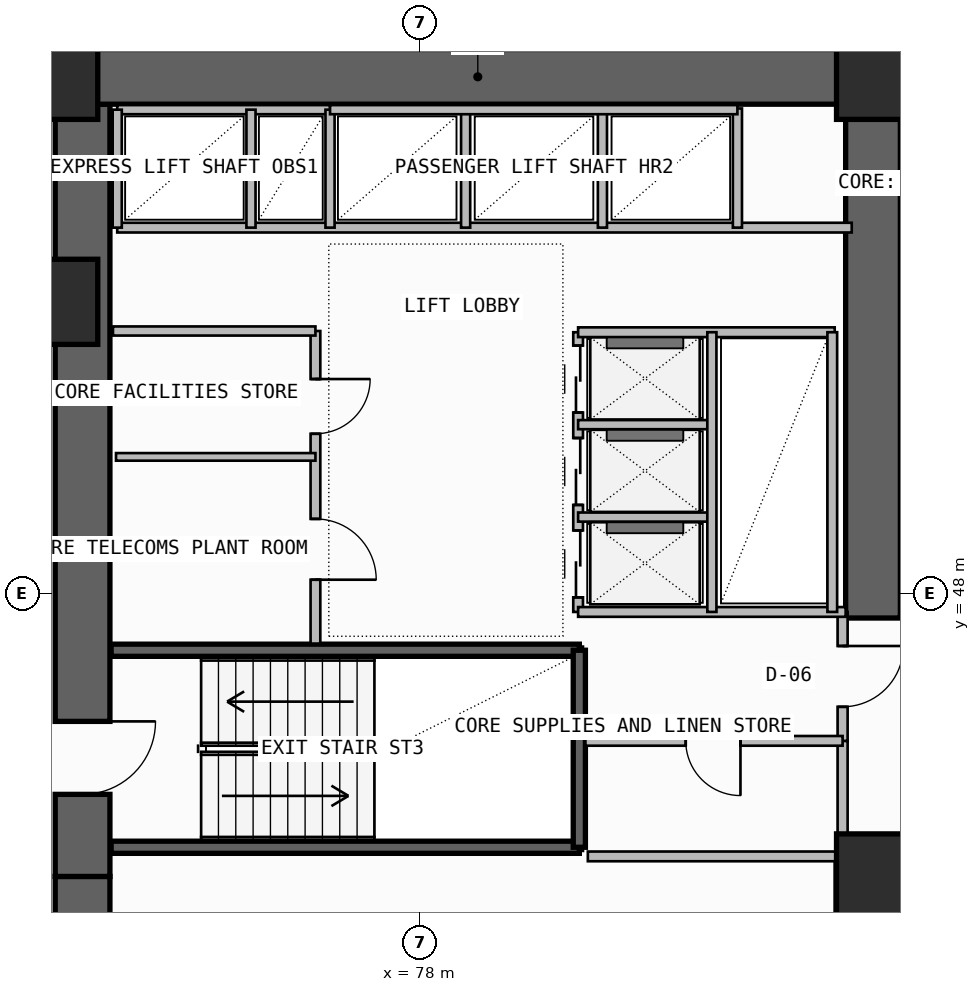
"""IFC4 building model, lengths in metres.
Left out: names, types, materials, properties, quantities, classifications, styles, units other than length and angle.
Written with IfcOpenShell. Run it as: python <this file> out.ifc"""

import sys

from ifc_helpers import new_model, si_unit, direction, frame, frame_2d, origin, origin_2d, place, context, subcontext, project, spatial, rectangle, extrude, element, fill, save


model = new_model("IFC4")
c1 = context("Model", 3, precision=1e-05, world=origin(), true_north=direction((0.0, 1.0)))
c2 = subcontext(c1, "Body", "Model", "MODEL_VIEW")
j1 = project(units=[si_unit("LENGTHUNIT", "METRE"), si_unit("PLANEANGLEUNIT", "RADIAN")], contexts=[c1])
p1 = place(None, origin())
s1 = spatial("IfcSite", under=j1, at=p1, CompositionType="ELEMENT")
p2 = place(p1, origin())
s2 = spatial("IfcBuilding", under=s1, at=p2, CompositionType="ELEMENT")
p3 = place(p2, frame((0.0, 0.0, 135.9)))
s3 = spatial("IfcBuildingStorey", under=s2, at=p3, CompositionType="ELEMENT", Elevation=135.9)
p4 = place(p3, frame((72.45, 35.5, -0.26), z_axis=(0.0, 0.0, 1.0), x_axis=(0.0, 1.0, 0.0)))
e1 = element("IfcWall", 1, at=p4, inside=s3, PredefinedType="SHEAR", context=c2, shape_type="SweptSolid", body=[
    extrude(rectangle(XDim=7.85, YDim=0.9, at=frame_2d((3.925, 0.0))), origin(), (0.0, 0.0, 1.0), 3.6),
])
p5 = place(p4, frame((1.45, 0.0, 0.26)))
e2 = element("IfcOpeningElement", 2, at=p5, cuts=e1, PredefinedType="OPENING", context=c2, shape_type="SweptSolid", body=[
    extrude(rectangle(XDim=1.2, YDim=2.2, at=frame_2d((0.6, 1.1))), frame((0.0, 0.46, 0.0), z_axis=(0.0, -1.0, 0.0), x_axis=(1.0, 0.0, 0.0)), (0.0, 0.0, 1.0), 0.92),
])
p6 = place(p3, frame((72.45, 43.35, -0.26), z_axis=(0.0, 0.0, 1.0), x_axis=(0.0, 1.0, 0.0)))
e3 = element("IfcWall", 3, at=p6, inside=s3, PredefinedType="SHEAR", context=c2, shape_type="SweptSolid", body=[
    extrude(rectangle(XDim=12.7, YDim=0.9, at=frame_2d((6.35, 0.0))), origin(), (0.0, 0.0, 1.0), 3.6),
])
p7 = place(p6, frame((1.35, 0.0, 0.26)))
e4 = element("IfcOpeningElement", 4, at=p7, cuts=e3, PredefinedType="OPENING", context=c2, shape_type="SweptSolid", body=[
    extrude(rectangle(XDim=1.2, YDim=2.2, at=frame_2d((0.6, 1.1))), frame((0.0, 0.46, 0.0), z_axis=(0.0, -1.0, 0.0), x_axis=(1.0, 0.0, 0.0)), (0.0, 0.0, 1.0), 0.92),
])
p8 = place(p3, frame((72.0, 56.5, -0.26), z_axis=(0.0, 0.0, 1.0), x_axis=(1.0, 0.0, 0.0)))
e5 = element("IfcWall", 5, at=p8, inside=s3, PredefinedType="SHEAR", context=c2, shape_type="SweptSolid", body=[
    extrude(rectangle(XDim=13.9, YDim=0.9, at=frame_2d((6.95, 0.0))), origin(), (0.0, 0.0, 1.0), 3.6),
])
p9 = place(p3, frame((85.45, 47.6, -0.26), z_axis=(0.0, 0.0, 1.0), x_axis=(0.0, 1.0, 0.0)))
e6 = element("IfcWall", 6, at=p9, inside=s3, PredefinedType="SHEAR", context=c2, shape_type="SweptSolid", body=[
    extrude(rectangle(XDim=8.45, YDim=0.9, at=frame_2d((4.225, 0.0))), origin(), (0.0, 0.0, 1.0), 3.6),
])
for number, where, z_axis, x_axis in (
    (7, (85.55, 43.35, 0.0), (0.0, 0.0, 1.0), (1.0, 0.0, 0.0)),
    (8, (72.0, 52.8, 0.0), (0.0, 0.0, 1.0), (1.0, 0.0, 0.0)),
    (9, (72.0, 56.5, 0.0), (0.0, 0.0, 1.0), (1.0, 0.0, 0.0)),
    (10, (85.55, 56.5, 0.0), (0.0, 0.0, 1.0), (1.0, 0.0, 0.0)),
):
    element("IfcColumn", number, at=place(p3, frame(where, z_axis=z_axis, x_axis=x_axis)), inside=s3, PredefinedType="COLUMN", context=c2, shape_type="SweptSolid", body=[
        extrude(rectangle(XDim=1.4, YDim=1.4, at=origin_2d()), origin(), (0.0, 0.0, 1.0), 3.6),
    ])
p10 = place(p3, frame((84.92, 38.85, 0.0), z_axis=(0.0, 0.0, 1.0), x_axis=(0.0, 1.0, 0.0)))
e11 = element("IfcWall", 11, at=p10, inside=s3, PredefinedType="SOLIDWALL", context=c2, shape_type="SweptSolid", body=[
    extrude(rectangle(XDim=4.83, YDim=0.2, at=frame_2d((2.415, 0.0))), origin(), (0.0, 0.0, 1.0), 3.34),
])
p11 = place(p10, frame((1.25, 0.0, 0.0)))
e12 = element("IfcOpeningElement", 12, at=p11, cuts=e11, PredefinedType="OPENING", context=c2, shape_type="SweptSolid", body=[
    extrude(rectangle(XDim=1.1, YDim=2.2, at=frame_2d((0.55, 1.1))), frame((0.0, 0.11, 0.0), z_axis=(0.0, -1.0, 0.0), x_axis=(1.0, 0.0, 0.0)), (0.0, 0.0, 1.0), 0.22),
])
for number, where, z_axis, x_axis in (
    (13, (72.92, 43.83, -0.26), (0.0, 0.0, 1.0), (1.0, 0.0, 0.0)),
    (14, (72.92, 47.07, -0.26), (0.0, 0.0, 1.0), (1.0, 0.0, 0.0)),
):
    element("IfcWall", number, at=place(p3, frame(where, z_axis=z_axis, x_axis=x_axis)), inside=s3, PredefinedType="SOLIDWALL", context=c2, shape_type="SweptSolid", body=[
        extrude(rectangle(XDim=7.7, YDim=0.2, at=frame_2d((3.85, 0.0))), origin(), (0.0, 0.0, 1.0), 3.6),
    ])
p12 = place(p3, frame((80.62, 43.83, -0.26), z_axis=(0.0, 0.0, 1.0), x_axis=(0.0, 1.0, 0.0)))
e15 = element("IfcWall", 15, at=p12, inside=s3, PredefinedType="SOLIDWALL", context=c2, shape_type="SweptSolid", body=[
    extrude(rectangle(XDim=3.24, YDim=0.2, at=frame_2d((1.62, 0.0))), origin(), (0.0, 0.0, 1.0), 3.6),
])
p13 = place(p3, frame((84.95, 43.68, 0.0), z_axis=(0.0, 0.0, 1.0), x_axis=(0.0, 1.0, 0.0)))
e16 = element("IfcWall", 16, at=p13, inside=s3, PredefinedType="PLUMBINGWALL", context=c2, shape_type="SweptSolid", body=[
    extrude(rectangle(XDim=1.9, YDim=0.165, at=frame_2d((0.95, 0.0))), origin(), (0.0, 0.0, 1.0), 3.34),
])
p14 = place(p3, frame((84.95, 45.58, 0.0), z_axis=(0.0, 0.0, 1.0), x_axis=(0.0, 1.0, 0.0)))
e17 = element("IfcWall", 17, at=p14, inside=s3, PredefinedType="PARTITIONING", context=c2, shape_type="SweptSolid", body=[
    extrude(rectangle(XDim=2.12, YDim=0.165, at=frame_2d((1.06, 0.0))), origin(), (0.0, 0.0, 1.0), 3.34),
])
p15 = place(p14, frame((0.56, 0.0, 0.0)))
e18 = element("IfcOpeningElement", 18, at=p15, cuts=e17, PredefinedType="OPENING", context=c2, shape_type="SweptSolid", body=[
    extrude(rectangle(XDim=1.0, YDim=2.2, at=frame_2d((0.5, 1.1))), frame((0.0, 0.093, 0.0), z_axis=(0.0, -1.0, 0.0), x_axis=(1.0, 0.0, 0.0)), (0.0, 0.0, 1.0), 0.185),
])
p16 = place(p3, frame((80.72, 45.58, 0.0), z_axis=(0.0, 0.0, 1.0), x_axis=(1.0, 0.0, 0.0)))
e19 = element("IfcWall", 19, at=p16, inside=s3, PredefinedType="PLUMBINGWALL", context=c2, shape_type="SweptSolid", body=[
    extrude(rectangle(XDim=4.23, YDim=0.16, at=frame_2d((2.115, 0.0))), origin(), (0.0, 0.0, 1.0), 3.34),
])
p17 = place(p16, frame((1.65, 0.0, 0.0)))
e20 = element("IfcOpeningElement", 20, at=p17, cuts=e19, PredefinedType="OPENING", context=c2, shape_type="SweptSolid", body=[
    extrude(rectangle(XDim=0.9, YDim=2.1, at=frame_2d((0.45, 1.05))), frame((0.0, 0.09, 0.0), z_axis=(0.0, -1.0, 0.0), x_axis=(1.0, 0.0, 0.0)), (0.0, 0.0, 1.0), 0.18),
])
p18 = place(p3, frame((80.76, 43.68, 0.0), z_axis=(0.0, 0.0, 1.0), x_axis=(1.0, 0.0, 0.0)))
e21 = element("IfcWall", 21, at=p18, inside=s3, PredefinedType="PLUMBINGWALL", context=c2, shape_type="SweptSolid", body=[
    extrude(rectangle(XDim=4.19, YDim=0.16, at=frame_2d((2.095, 0.0))), origin(), (0.0, 0.0, 1.0), 3.34),
])
p19 = place(p3, frame((76.28, 47.18, 0.0), z_axis=(0.0, 0.0, 1.0), x_axis=(0.0, 1.0, 0.0)))
e22 = element("IfcWall", 22, at=p19, inside=s3, PredefinedType="SOLIDWALL", context=c2, shape_type="SweptSolid", body=[
    extrude(rectangle(XDim=5.14, YDim=0.16, at=frame_2d((2.57, 0.0))), origin(), (0.0, 0.0, 1.0), 3.34),
])
p20 = place(p19, frame((1.05, 0.0, 0.0)))
e23 = element("IfcOpeningElement", 23, at=p20, cuts=e22, PredefinedType="OPENING", context=c2, shape_type="SweptSolid", body=[
    extrude(rectangle(XDim=1.0, YDim=2.2, at=frame_2d((0.5, 1.1))), frame((0.0, 0.09, 0.0), z_axis=(0.0, -1.0, 0.0), x_axis=(1.0, 0.0, 0.0)), (0.0, 0.0, 1.0), 0.18),
])
p21 = place(p19, frame((3.45, 0.0, 0.0)))
e24 = element("IfcOpeningElement", 24, at=p21, cuts=e22, PredefinedType="OPENING", context=c2, shape_type="SweptSolid", body=[
    extrude(rectangle(XDim=0.9, YDim=2.1, at=frame_2d((0.45, 1.05))), frame((0.0, 0.09, 0.0), z_axis=(0.0, -1.0, 0.0), x_axis=(1.0, 0.0, 0.0)), (0.0, 0.0, 1.0), 0.18),
])
p22 = place(p3, frame((72.95, 52.32, 0.0), z_axis=(0.0, 0.0, 1.0), x_axis=(1.0, 0.0, 0.0)))
e25 = element("IfcWall", 25, at=p22, inside=s3, PredefinedType="SOLIDWALL", context=c2, shape_type="SweptSolid", body=[
    extrude(rectangle(XDim=3.33, YDim=0.15, at=frame_2d((1.665, 0.0))), origin(), (0.0, 0.0, 1.0), 3.34),
])
p23 = place(p3, frame((73.0, 50.25, 0.0), z_axis=(0.0, 0.0, 1.0), x_axis=(1.0, 0.0, 0.0)))
e26 = element("IfcWall", 26, at=p23, inside=s3, PredefinedType="PARTITIONING", context=c2, shape_type="SweptSolid", body=[
    extrude(rectangle(XDim=3.28, YDim=0.125, at=frame_2d((1.64, 0.0))), origin(), (0.0, 0.0, 1.0), 3.34),
])
p24 = place(p3, frame((80.6, 47.7, 0.0), z_axis=(0.0, 0.0, 1.0), x_axis=(0.0, 1.0, 0.0)))
e27 = element("IfcWall", 27, at=p24, inside=s3, PredefinedType="SOLIDWALL", context=c2, shape_type="SweptSolid", body=[
    extrude(rectangle(XDim=4.6, YDim=0.16, at=frame_2d((2.3, 0.0))), origin(), (0.0, 0.0, 1.0), 3.34),
])
p25 = place(p24, frame((0.24, 0.0, 0.0)))
e28 = element("IfcOpeningElement", 28, at=p25, cuts=e27, PredefinedType="OPENING", context=c2, shape_type="SweptSolid", body=[
    extrude(rectangle(XDim=1.1, YDim=2.25, at=frame_2d((0.55, 1.125))), frame((0.0, 0.09, 0.0), z_axis=(0.0, -1.0, 0.0), x_axis=(1.0, 0.0, 0.0)), (0.0, 0.0, 1.0), 0.18),
])
p26 = place(p24, frame((1.76, 0.0, 0.0)))
e29 = element("IfcOpeningElement", 29, at=p26, cuts=e27, PredefinedType="OPENING", context=c2, shape_type="SweptSolid", body=[
    extrude(rectangle(XDim=1.1, YDim=2.25, at=frame_2d((0.55, 1.125))), frame((0.0, 0.09, 0.0), z_axis=(0.0, -1.0, 0.0), x_axis=(1.0, 0.0, 0.0)), (0.0, 0.0, 1.0), 0.18),
])
p27 = place(p24, frame((3.28, 0.0, 0.0)))
e30 = element("IfcOpeningElement", 30, at=p27, cuts=e27, PredefinedType="OPENING", context=c2, shape_type="SweptSolid", body=[
    extrude(rectangle(XDim=1.1, YDim=2.25, at=frame_2d((0.55, 1.125))), frame((0.0, 0.09, 0.0), z_axis=(0.0, -1.0, 0.0), x_axis=(1.0, 0.0, 0.0)), (0.0, 0.0, 1.0), 0.18),
])
p28 = place(p3, frame((80.6, 47.7, 0.0), z_axis=(0.0, 0.0, 1.0), x_axis=(1.0, 0.0, 0.0)))
e31 = element("IfcWall", 31, at=p28, inside=s3, PredefinedType="SOLIDWALL", context=c2, shape_type="SweptSolid", body=[
    extrude(rectangle(XDim=4.4, YDim=0.16, at=frame_2d((2.2, 0.0))), origin(), (0.0, 0.0, 1.0), 3.34),
])
p29 = place(p3, frame((80.6, 52.3, 0.0), z_axis=(0.0, 0.0, 1.0), x_axis=(1.0, 0.0, 0.0)))
e32 = element("IfcWall", 32, at=p29, inside=s3, PredefinedType="SOLIDWALL", context=c2, shape_type="SweptSolid", body=[
    extrude(rectangle(XDim=4.22, YDim=0.16, at=frame_2d((2.11, 0.0))), origin(), (0.0, 0.0, 1.0), 3.34),
])
for number, where, z_axis, x_axis in (
    (33, (80.6, 49.26, 0.0), (0.0, 0.0, 1.0), (1.0, 0.0, 0.0)),
    (34, (80.6, 50.78, 0.0), (0.0, 0.0, 1.0), (1.0, 0.0, 0.0)),
):
    element("IfcWall", number, at=place(p3, frame(where, z_axis=z_axis, x_axis=x_axis)), inside=s3, PredefinedType="PLUMBINGWALL", context=c2, shape_type="SweptSolid", body=[
        extrude(rectangle(XDim=2.2, YDim=0.15, at=frame_2d((1.1, 0.0))), origin(), (0.0, 0.0, 1.0), 3.34),
    ])
p30 = place(p3, frame((82.8, 47.7, 0.0), z_axis=(0.0, 0.0, 1.0), x_axis=(0.0, 1.0, 0.0)))
e35 = element("IfcWall", 35, at=p30, inside=s3, PredefinedType="PLUMBINGWALL", context=c2, shape_type="SweptSolid", body=[
    extrude(rectangle(XDim=4.6, YDim=0.15, at=frame_2d((2.3, 0.0))), origin(), (0.0, 0.0, 1.0), 3.34),
])
p31 = place(p3, frame((84.78, 47.7, 0.0), z_axis=(0.0, 0.0, 1.0), x_axis=(0.0, 1.0, 0.0)))
e36 = element("IfcWall", 36, at=p31, inside=s3, PredefinedType="SOLIDWALL", context=c2, shape_type="SweptSolid", body=[
    extrude(rectangle(XDim=4.6, YDim=0.16, at=frame_2d((2.3, 0.0))), origin(), (0.0, 0.0, 1.0), 3.34),
])
p32 = place(p3, frame((73.02, 54.02, 0.0), z_axis=(0.0, 0.0, 1.0), x_axis=(1.0, 0.0, 0.0)))
e37 = element("IfcWall", 37, at=p32, inside=s3, PredefinedType="SOLIDWALL", context=c2, shape_type="SweptSolid", body=[
    extrude(rectangle(XDim=12.08, YDim=0.16, at=frame_2d((6.04, 0.0))), origin(), (0.0, 0.0, 1.0), 3.34),
])
p33 = place(p3, frame((73.02, 55.96, 0.0), z_axis=(0.0, 0.0, 1.0), x_axis=(1.0, 0.0, 0.0)))
e38 = element("IfcWall", 38, at=p33, inside=s3, PredefinedType="SOLIDWALL", context=c2, shape_type="SweptSolid", body=[
    extrude(rectangle(XDim=3.5, YDim=0.15, at=frame_2d((1.75, 0.0))), origin(), (0.0, 0.0, 1.0), 3.34),
])
p34 = place(p3, frame((73.02, 54.02, 0.0), z_axis=(0.0, 0.0, 1.0), x_axis=(0.0, 1.0, 0.0)))
e39 = element("IfcWall", 39, at=p34, inside=s3, PredefinedType="PLUMBINGWALL", context=c2, shape_type="SweptSolid", body=[
    extrude(rectangle(XDim=1.94, YDim=0.15, at=frame_2d((0.97, 0.0))), origin(), (0.0, 0.0, 1.0), 3.34),
])
p35 = place(p3, frame((76.52, 54.02, 0.0), z_axis=(0.0, 0.0, 1.0), x_axis=(0.0, 1.0, 0.0)))
e40 = element("IfcWall", 40, at=p35, inside=s3, PredefinedType="SOLIDWALL", context=c2, shape_type="SweptSolid", body=[
    extrude(rectangle(XDim=1.94, YDim=0.15, at=frame_2d((0.97, 0.0))), origin(), (0.0, 0.0, 1.0), 3.34),
])
p36 = place(p3, frame((75.22, 54.02, 0.0), z_axis=(0.0, 0.0, 1.0), x_axis=(0.0, 1.0, 0.0)))
e41 = element("IfcWall", 41, at=p36, inside=s3, PredefinedType="PLUMBINGWALL", context=c2, shape_type="SweptSolid", body=[
    extrude(rectangle(XDim=1.94, YDim=0.15, at=frame_2d((0.97, 0.0))), origin(), (0.0, 0.0, 1.0), 3.34),
])
for number, where, z_axis, x_axis in (
    (42, (78.75, 54.02, 0.0), (0.0, 0.0, 1.0), (0.0, 1.0, 0.0)),
    (43, (81.0, 54.02, 0.0), (0.0, 0.0, 1.0), (0.0, 1.0, 0.0)),
):
    element("IfcWall", number, at=place(p3, frame(where, z_axis=z_axis, x_axis=x_axis)), inside=s3, PredefinedType="PLUMBINGWALL", context=c2, shape_type="SweptSolid", body=[
        extrude(rectangle(XDim=1.96, YDim=0.15, at=frame_2d((0.98, 0.0))), origin(), (0.0, 0.0, 1.0), 3.34),
    ])
p37 = place(p3, frame((83.22, 54.02, 0.0), z_axis=(0.0, 0.0, 1.0), x_axis=(0.0, 1.0, 0.0)))
e44 = element("IfcWall", 44, at=p37, inside=s3, PredefinedType="SOLIDWALL", context=c2, shape_type="SweptSolid", body=[
    extrude(rectangle(XDim=1.96, YDim=0.15, at=frame_2d((0.98, 0.0))), origin(), (0.0, 0.0, 1.0), 3.34),
])
p38 = place(p3, frame((76.52, 55.96, 0.0), z_axis=(0.0, 0.0, 1.0), x_axis=(1.0, 0.0, 0.0)))
e45 = element("IfcWall", 45, at=p38, inside=s3, PredefinedType="SOLIDWALL", context=c2, shape_type="SweptSolid", body=[
    extrude(rectangle(XDim=6.7, YDim=0.15, at=frame_2d((3.35, 0.0))), origin(), (0.0, 0.0, 1.0), 3.34),
])
p39 = place(p7, frame((1.2, 0.0, 0.0), z_axis=(0.0, 0.0, 1.0), x_axis=(-1.0, 0.0, 0.0)))
e46 = element("IfcDoor", 46, at=p39, inside=s3, OperationType="SINGLE_SWING_LEFT", PredefinedType="USERDEFINED", context=c2, shape_type="SweptSolid", body=[
    extrude(rectangle(XDim=1.2, YDim=2.2, at=frame_2d((0.6, 1.1))), frame((0.0, 0.025, 0.0), z_axis=(0.0, -1.0, 0.0), x_axis=(1.0, 0.0, 0.0)), (0.0, 0.0, 1.0), 0.05),
])
fill(e4, e46)
p40 = place(p15, frame((1.0, 0.0, 0.0), z_axis=(0.0, 0.0, 1.0), x_axis=(-1.0, 0.0, 0.0)))
e47 = element("IfcDoor", 47, at=p40, inside=s3, OperationType="SINGLE_SWING_LEFT", PredefinedType="DOOR", context=c2, shape_type="SweptSolid", body=[
    extrude(rectangle(XDim=1.0, YDim=2.2, at=frame_2d((0.5, 1.1))), frame((0.0, 0.025, 0.0), z_axis=(0.0, -1.0, 0.0), x_axis=(1.0, 0.0, 0.0)), (0.0, 0.0, 1.0), 0.05),
])
fill(e18, e47)
p41 = place(p17, frame((0.9, 0.0, 0.0), z_axis=(0.0, 0.0, 1.0), x_axis=(-1.0, 0.0, 0.0)))
e48 = element("IfcDoor", 48, at=p41, inside=s3, OperationType="SINGLE_SWING_LEFT", PredefinedType="DOOR", context=c2, shape_type="SweptSolid", body=[
    extrude(rectangle(XDim=0.9, YDim=2.1, at=frame_2d((0.45, 1.05))), frame((0.0, 0.025, 0.0), z_axis=(0.0, -1.0, 0.0), x_axis=(1.0, 0.0, 0.0)), (0.0, 0.0, 1.0), 0.05),
])
fill(e20, e48)
p42 = place(p20, frame((1.0, 0.0, 0.0), z_axis=(0.0, 0.0, 1.0), x_axis=(-1.0, 0.0, 0.0)))
e49 = element("IfcDoor", 49, at=p42, inside=s3, OperationType="SINGLE_SWING_RIGHT", PredefinedType="DOOR", context=c2, shape_type="SweptSolid", body=[
    extrude(rectangle(XDim=1.0, YDim=2.2, at=frame_2d((0.5, 1.1))), frame((0.0, 0.025, 0.0), z_axis=(0.0, -1.0, 0.0), x_axis=(1.0, 0.0, 0.0)), (0.0, 0.0, 1.0), 0.05),
])
fill(e23, e49)
p43 = place(p21, frame((0.9, 0.0, 0.0), z_axis=(0.0, 0.0, 1.0), x_axis=(-1.0, 0.0, 0.0)))
e50 = element("IfcDoor", 50, at=p43, inside=s3, OperationType="SINGLE_SWING_LEFT", PredefinedType="DOOR", context=c2, shape_type="SweptSolid", body=[
    extrude(rectangle(XDim=0.9, YDim=2.1, at=frame_2d((0.45, 1.05))), frame((0.0, 0.025, 0.0), z_axis=(0.0, -1.0, 0.0), x_axis=(1.0, 0.0, 0.0)), (0.0, 0.0, 1.0), 0.05),
])
fill(e24, e50)
p44 = place(p25, frame((1.1, 0.0, 0.0), z_axis=(0.0, 0.0, 1.0), x_axis=(-1.0, 0.0, 0.0)))
e51 = element("IfcDoor", 51, at=p44, inside=s3, OperationType="DOUBLE_DOOR_SLIDING", PredefinedType="DOOR", context=c2, shape_type="SweptSolid", body=[
    extrude(rectangle(XDim=1.1, YDim=2.25, at=frame_2d((0.55, 1.125))), frame((0.0, 0.025, 0.0), z_axis=(0.0, -1.0, 0.0), x_axis=(1.0, 0.0, 0.0)), (0.0, 0.0, 1.0), 0.05),
])
fill(e28, e51)
p45 = place(p26, frame((1.1, 0.0, 0.0), z_axis=(0.0, 0.0, 1.0), x_axis=(-1.0, 0.0, 0.0)))
e52 = element("IfcDoor", 52, at=p45, inside=s3, OperationType="DOUBLE_DOOR_SLIDING", PredefinedType="DOOR", context=c2, shape_type="SweptSolid", body=[
    extrude(rectangle(XDim=1.1, YDim=2.25, at=frame_2d((0.55, 1.125))), frame((0.0, 0.025, 0.0), z_axis=(0.0, -1.0, 0.0), x_axis=(1.0, 0.0, 0.0)), (0.0, 0.0, 1.0), 0.05),
])
fill(e29, e52)
p46 = place(p27, frame((1.1, 0.0, 0.0), z_axis=(0.0, 0.0, 1.0), x_axis=(-1.0, 0.0, 0.0)))
e53 = element("IfcDoor", 53, at=p46, inside=s3, OperationType="DOUBLE_DOOR_SLIDING", PredefinedType="DOOR", context=c2, shape_type="SweptSolid", body=[
    extrude(rectangle(XDim=1.1, YDim=2.25, at=frame_2d((0.55, 1.125))), frame((0.0, 0.025, 0.0), z_axis=(0.0, -1.0, 0.0), x_axis=(1.0, 0.0, 0.0)), (0.0, 0.0, 1.0), 0.05),
])
fill(e30, e53)
save(model, sys.argv[1])
